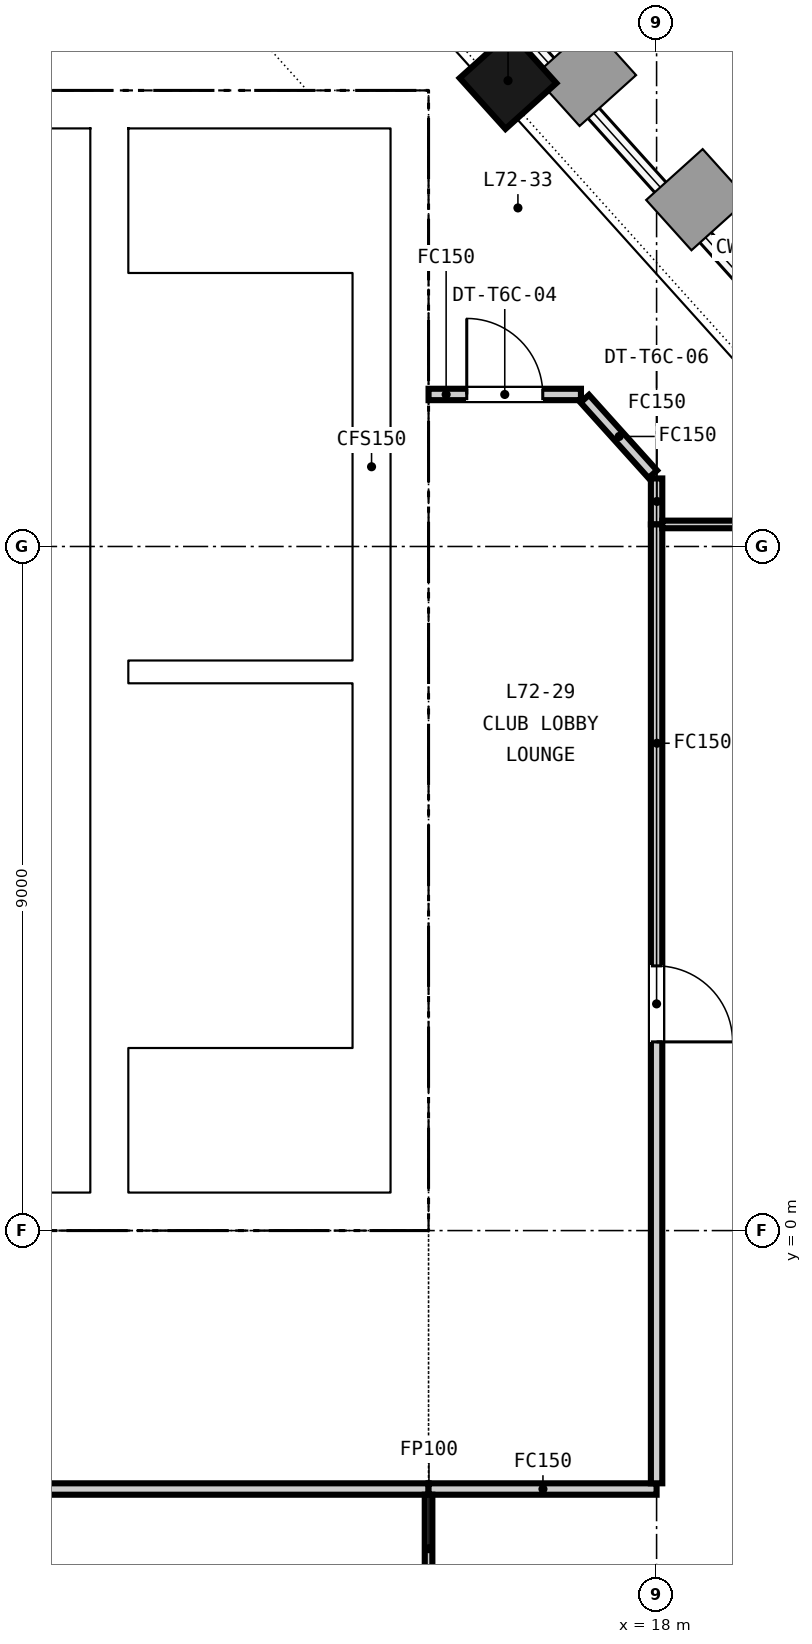
"""IFC4 building model, lengths in metres.
Left out: names, types, materials, properties, quantities, classifications, styles, units other than length and angle.
Written with IfcOpenShell. Run it as: python <this file> out.ifc"""

import sys

from ifc_helpers import new_model, si_unit, direction, frame, frame_2d, origin, origin_2d, place, context, subcontext, project, spatial, rectangle, extrude, element, fill, save


model = new_model("IFC4")
c1 = context("Model", 3, precision=1e-05, world=origin(), true_north=direction((0.0, 1.0)))
c2 = subcontext(c1, "Body", "Model", "MODEL_VIEW")
j1 = project(units=[si_unit("LENGTHUNIT", "METRE"), si_unit("PLANEANGLEUNIT", "RADIAN")], contexts=[c1])
p1 = place(None, origin())
s1 = spatial("IfcSite", under=j1, at=p1, CompositionType="ELEMENT")
p2 = place(p1, origin())
s2 = spatial("IfcBuilding", under=s1, at=p2, CompositionType="ELEMENT")
p3 = place(p2, frame((0.0, 0.0, 282.85)))
s3 = spatial("IfcBuildingStorey", under=s2, at=p3, CompositionType="ELEMENT", Elevation=282.85)
p4 = place(p3, frame((-15.0, 0.25, -0.15), z_axis=(0.0, 0.0, 1.0), x_axis=(1.0, 0.0, 0.0)))
e1 = element("IfcWall", 1, at=p4, inside=s3, PredefinedType="SOLIDWALL", context=c2, shape_type="SweptSolid", body=[
    extrude(rectangle(XDim=30.0, YDim=0.5, at=frame_2d((15.0, 0.0))), origin(), (0.0, 0.0, 1.0), 3.65),
])
p5 = place(p4, frame((5.8, 0.0, 0.15)))
e2 = element("IfcOpeningElement", 2, at=p5, cuts=e1, PredefinedType="OPENING", context=c2, shape_type="SweptSolid", body=[
    extrude(rectangle(XDim=2.4, YDim=2.4, at=frame_2d((1.2, 1.2))), frame((0.0, 0.26, 0.0), z_axis=(0.0, -1.0, 0.0), x_axis=(1.0, 0.0, 0.0)), (0.0, 0.0, 1.0), 0.52),
])
p6 = place(p4, frame((13.8, 0.0, 0.15)))
e3 = element("IfcOpeningElement", 3, at=p6, cuts=e1, PredefinedType="OPENING", context=c2, shape_type="SweptSolid", body=[
    extrude(rectangle(XDim=2.4, YDim=2.4, at=frame_2d((1.2, 1.2))), frame((0.0, 0.26, 0.0), z_axis=(0.0, -1.0, 0.0), x_axis=(1.0, 0.0, 0.0)), (0.0, 0.0, 1.0), 0.52),
])
p7 = place(p4, frame((21.8, 0.0, 0.15)))
e4 = element("IfcOpeningElement", 4, at=p7, cuts=e1, PredefinedType="OPENING", context=c2, shape_type="SweptSolid", body=[
    extrude(rectangle(XDim=2.4, YDim=2.4, at=frame_2d((1.2, 1.2))), frame((0.0, 0.26, 0.0), z_axis=(0.0, -1.0, 0.0), x_axis=(1.0, 0.0, 0.0)), (0.0, 0.0, 1.0), 0.52),
])
p8 = place(p4, frame((1.5, 0.0, 0.15)))
e5 = element("IfcOpeningElement", 5, at=p8, cuts=e1, PredefinedType="OPENING", context=c2, shape_type="SweptSolid", body=[
    extrude(rectangle(XDim=1.2, YDim=2.1, at=frame_2d((0.6, 1.05))), frame((0.0, 0.26, 0.0), z_axis=(0.0, -1.0, 0.0), x_axis=(1.0, 0.0, 0.0)), (0.0, 0.0, 1.0), 0.52),
])
p9 = place(p4, frame((27.3, 0.0, 0.15)))
e6 = element("IfcOpeningElement", 6, at=p9, cuts=e1, PredefinedType="OPENING", context=c2, shape_type="SweptSolid", body=[
    extrude(rectangle(XDim=1.2, YDim=2.1, at=frame_2d((0.6, 1.05))), frame((0.0, 0.26, 0.0), z_axis=(0.0, -1.0, 0.0), x_axis=(1.0, 0.0, 0.0)), (0.0, 0.0, 1.0), 0.52),
])
p10 = place(p3, frame((-15.0, 14.75, -0.15), z_axis=(0.0, 0.0, 1.0), x_axis=(1.0, 0.0, 0.0)))
e7 = element("IfcWall", 7, at=p10, inside=s3, PredefinedType="SOLIDWALL", context=c2, shape_type="SweptSolid", body=[
    extrude(rectangle(XDim=30.0, YDim=0.5, at=frame_2d((15.0, 0.0))), origin(), (0.0, 0.0, 1.0), 3.65),
])
p11 = place(p10, frame((9.25, 0.0, 0.15)))
e8 = element("IfcOpeningElement", 8, at=p11, cuts=e7, PredefinedType="OPENING", context=c2, shape_type="SweptSolid", body=[
    extrude(rectangle(XDim=1.5, YDim=2.1, at=frame_2d((0.75, 1.05))), frame((0.0, 0.26, 0.0), z_axis=(0.0, -1.0, 0.0), x_axis=(1.0, 0.0, 0.0)), (0.0, 0.0, 1.0), 0.52),
])
p12 = place(p10, frame((19.4, 0.0, 0.15)))
e9 = element("IfcOpeningElement", 9, at=p12, cuts=e7, PredefinedType="OPENING", context=c2, shape_type="SweptSolid", body=[
    extrude(rectangle(XDim=1.5, YDim=2.1, at=frame_2d((0.75, 1.05))), frame((0.0, 0.26, 0.0), z_axis=(0.0, -1.0, 0.0), x_axis=(1.0, 0.0, 0.0)), (0.0, 0.0, 1.0), 0.52),
])
p13 = place(p10, frame((1.5, 0.0, 0.15)))
e10 = element("IfcOpeningElement", 10, at=p13, cuts=e7, PredefinedType="OPENING", context=c2, shape_type="SweptSolid", body=[
    extrude(rectangle(XDim=1.2, YDim=2.1, at=frame_2d((0.6, 1.05))), frame((0.0, 0.26, 0.0), z_axis=(0.0, -1.0, 0.0), x_axis=(1.0, 0.0, 0.0)), (0.0, 0.0, 1.0), 0.52),
])
p14 = place(p10, frame((27.3, 0.0, 0.15)))
e11 = element("IfcOpeningElement", 11, at=p14, cuts=e7, PredefinedType="OPENING", context=c2, shape_type="SweptSolid", body=[
    extrude(rectangle(XDim=1.2, YDim=2.1, at=frame_2d((0.6, 1.05))), frame((0.0, 0.26, 0.0), z_axis=(0.0, -1.0, 0.0), x_axis=(1.0, 0.0, 0.0)), (0.0, 0.0, 1.0), 0.52),
])
for number, where, z_axis, x_axis in (
    (12, (14.75, 0.5, -0.15), (0.0, 0.0, 1.0), (0.0, 1.0, 0.0)),
    (13, (10.8, 0.5, -0.15), (0.0, 0.0, 1.0), (0.0, 1.0, 0.0)),
):
    element("IfcWall", number, at=place(p3, frame(where, z_axis=z_axis, x_axis=x_axis)), inside=s3, PredefinedType="SOLIDWALL", context=c2, shape_type="SweptSolid", body=[
        extrude(rectangle(XDim=14.0, YDim=0.5, at=frame_2d((7.0, 0.0))), origin(), (0.0, 0.0, 1.0), 3.65),
    ])
p15 = place(p3, frame((16.045, 15.129, -0.15), z_axis=(0.0, 0.0, 1.0), x_axis=(-0.669130606359, 0.743144825477, 0.0)))
e14 = element("IfcColumn", 14, at=p15, inside=s3, PredefinedType="COLUMN", context=c2, shape_type="SweptSolid", body=[
    extrude(rectangle(XDim=0.9, YDim=0.9, at=origin_2d()), origin(), (0.0, 0.0, 1.0), 3.65),
])
p16 = place(p3, frame((-10.55, 3.5, 0.0), z_axis=(0.0, 0.0, 1.0), x_axis=(1.0, 0.0, 0.0)))
e15 = element("IfcWall", 15, at=p16, inside=s3, PredefinedType="PARTITIONING", context=c2, shape_type="SweptSolid", body=[
    extrude(rectangle(XDim=21.1, YDim=0.2, at=frame_2d((10.55, 0.0))), origin(), (0.0, 0.0, 1.0), 3.5),
])
p17 = place(p16, frame((0.675, 0.0, 0.0)))
e16 = element("IfcOpeningElement", 16, at=p17, cuts=e15, PredefinedType="OPENING", context=c2, shape_type="SweptSolid", body=[
    extrude(rectangle(XDim=1.2, YDim=2.1, at=frame_2d((0.6, 1.05))), frame((0.0, 0.11, 0.0), z_axis=(0.0, -1.0, 0.0), x_axis=(1.0, 0.0, 0.0)), (0.0, 0.0, 1.0), 0.22),
])
p18 = place(p16, frame((3.475, 0.0, 0.0)))
e17 = element("IfcOpeningElement", 17, at=p18, cuts=e15, PredefinedType="OPENING", context=c2, shape_type="SweptSolid", body=[
    extrude(rectangle(XDim=1.2, YDim=2.1, at=frame_2d((0.6, 1.05))), frame((0.0, 0.11, 0.0), z_axis=(0.0, -1.0, 0.0), x_axis=(1.0, 0.0, 0.0)), (0.0, 0.0, 1.0), 0.22),
])
p19 = place(p16, frame((6.275, 0.0, 0.0)))
e18 = element("IfcOpeningElement", 18, at=p19, cuts=e15, PredefinedType="OPENING", context=c2, shape_type="SweptSolid", body=[
    extrude(rectangle(XDim=1.2, YDim=2.1, at=frame_2d((0.6, 1.05))), frame((0.0, 0.11, 0.0), z_axis=(0.0, -1.0, 0.0), x_axis=(1.0, 0.0, 0.0)), (0.0, 0.0, 1.0), 0.22),
])
p20 = place(p16, frame((9.075, 0.0, 0.0)))
e19 = element("IfcOpeningElement", 19, at=p20, cuts=e15, PredefinedType="OPENING", context=c2, shape_type="SweptSolid", body=[
    extrude(rectangle(XDim=1.2, YDim=2.1, at=frame_2d((0.6, 1.05))), frame((0.0, 0.11, 0.0), z_axis=(0.0, -1.0, 0.0), x_axis=(1.0, 0.0, 0.0)), (0.0, 0.0, 1.0), 0.22),
])
p21 = place(p16, frame((11.875, 0.0, 0.0)))
e20 = element("IfcOpeningElement", 20, at=p21, cuts=e15, PredefinedType="OPENING", context=c2, shape_type="SweptSolid", body=[
    extrude(rectangle(XDim=1.2, YDim=2.1, at=frame_2d((0.6, 1.05))), frame((0.0, 0.11, 0.0), z_axis=(0.0, -1.0, 0.0), x_axis=(1.0, 0.0, 0.0)), (0.0, 0.0, 1.0), 0.22),
])
p22 = place(p16, frame((14.675, 0.0, 0.0)))
e21 = element("IfcOpeningElement", 21, at=p22, cuts=e15, PredefinedType="OPENING", context=c2, shape_type="SweptSolid", body=[
    extrude(rectangle(XDim=1.2, YDim=2.1, at=frame_2d((0.6, 1.05))), frame((0.0, 0.11, 0.0), z_axis=(0.0, -1.0, 0.0), x_axis=(1.0, 0.0, 0.0)), (0.0, 0.0, 1.0), 0.22),
])
p23 = place(p16, frame((17.475, 0.0, 0.0)))
e22 = element("IfcOpeningElement", 22, at=p23, cuts=e15, PredefinedType="OPENING", context=c2, shape_type="SweptSolid", body=[
    extrude(rectangle(XDim=1.2, YDim=2.1, at=frame_2d((0.6, 1.05))), frame((0.0, 0.11, 0.0), z_axis=(0.0, -1.0, 0.0), x_axis=(1.0, 0.0, 0.0)), (0.0, 0.0, 1.0), 0.22),
])
p24 = place(p16, frame((19.9, 0.0, 0.0)))
e23 = element("IfcOpeningElement", 23, at=p24, cuts=e15, PredefinedType="OPENING", context=c2, shape_type="SweptSolid", body=[
    extrude(rectangle(XDim=0.9, YDim=2.1, at=frame_2d((0.45, 1.05))), frame((0.0, 0.11, 0.0), z_axis=(0.0, -1.0, 0.0), x_axis=(1.0, 0.0, 0.0)), (0.0, 0.0, 1.0), 0.22),
])
p25 = place(p3, frame((-10.55, 6.025, 0.0), z_axis=(0.0, 0.0, 1.0), x_axis=(1.0, 0.0, 0.0)))
e24 = element("IfcWall", 24, at=p25, inside=s3, PredefinedType="PARTITIONING", context=c2, shape_type="SweptSolid", body=[
    extrude(rectangle(XDim=21.1, YDim=0.25, at=frame_2d((10.55, 0.0))), origin(), (0.0, 0.0, 1.0), 3.5),
])
p26 = place(p3, frame((-4.125, 8.55, 0.0), z_axis=(0.0, 0.0, 1.0), x_axis=(1.0, 0.0, 0.0)))
e25 = element("IfcWall", 25, at=p26, inside=s3, PredefinedType="PARTITIONING", context=c2, shape_type="SweptSolid", body=[
    extrude(rectangle(XDim=14.675, YDim=0.2, at=frame_2d((7.337, 0.0))), origin(), (0.0, 0.0, 1.0), 3.5),
])
p27 = place(p26, frame((1.413, 0.0, 0.0)))
e26 = element("IfcOpeningElement", 26, at=p27, cuts=e25, PredefinedType="OPENING", context=c2, shape_type="SweptSolid", body=[
    extrude(rectangle(XDim=1.0, YDim=2.1, at=frame_2d((0.5, 1.05))), frame((0.0, 0.11, 0.0), z_axis=(0.0, -1.0, 0.0), x_axis=(1.0, 0.0, 0.0)), (0.0, 0.0, 1.0), 0.22),
])
p28 = place(p26, frame((5.0, 0.0, 0.0)))
e27 = element("IfcOpeningElement", 27, at=p28, cuts=e25, PredefinedType="OPENING", context=c2, shape_type="SweptSolid", body=[
    extrude(rectangle(XDim=1.0, YDim=2.1, at=frame_2d((0.5, 1.05))), frame((0.0, 0.11, 0.0), z_axis=(0.0, -1.0, 0.0), x_axis=(1.0, 0.0, 0.0)), (0.0, 0.0, 1.0), 0.22),
])
p29 = place(p26, frame((9.613, 0.0, 0.0)))
e28 = element("IfcOpeningElement", 28, at=p29, cuts=e25, PredefinedType="OPENING", context=c2, shape_type="SweptSolid", body=[
    extrude(rectangle(XDim=1.0, YDim=2.1, at=frame_2d((0.5, 1.05))), frame((0.0, 0.11, 0.0), z_axis=(0.0, -1.0, 0.0), x_axis=(1.0, 0.0, 0.0)), (0.0, 0.0, 1.0), 0.22),
])
p30 = place(p26, frame((13.475, 0.0, 0.0)))
e29 = element("IfcOpeningElement", 29, at=p30, cuts=e25, PredefinedType="OPENING", context=c2, shape_type="SweptSolid", body=[
    extrude(rectangle(XDim=0.9, YDim=2.1, at=frame_2d((0.45, 1.05))), frame((0.0, 0.11, 0.0), z_axis=(0.0, -1.0, 0.0), x_axis=(1.0, 0.0, 0.0)), (0.0, 0.0, 1.0), 0.22),
])
p31 = place(p3, frame((5.9, 11.2, 0.0), z_axis=(0.0, 0.0, 1.0), x_axis=(1.0, 0.0, 0.0)))
e30 = element("IfcWall", 30, at=p31, inside=s3, PredefinedType="PARTITIONING", context=c2, shape_type="SweptSolid", body=[
    extrude(rectangle(XDim=4.65, YDim=0.2, at=frame_2d((2.325, 0.0))), origin(), (0.0, 0.0, 1.0), 3.5),
])
p32 = place(p31, frame((1.025, 0.0, 0.0)))
e31 = element("IfcOpeningElement", 31, at=p32, cuts=e30, PredefinedType="OPENING", context=c2, shape_type="SweptSolid", body=[
    extrude(rectangle(XDim=1.0, YDim=2.1, at=frame_2d((0.5, 1.05))), frame((0.0, 0.11, 0.0), z_axis=(0.0, -1.0, 0.0), x_axis=(1.0, 0.0, 0.0)), (0.0, 0.0, 1.0), 0.22),
])
p33 = place(p31, frame((3.4, 0.0, 0.0)))
e32 = element("IfcOpeningElement", 32, at=p33, cuts=e30, PredefinedType="OPENING", context=c2, shape_type="SweptSolid", body=[
    extrude(rectangle(XDim=0.9, YDim=2.1, at=frame_2d((0.45, 1.05))), frame((0.0, 0.11, 0.0), z_axis=(0.0, -1.0, 0.0), x_axis=(1.0, 0.0, 0.0)), (0.0, 0.0, 1.0), 0.22),
])
p34 = place(p3, frame((11.05, 7.35, 0.0), z_axis=(0.0, 0.0, 1.0), x_axis=(1.0, 0.0, 0.0)))
e33 = element("IfcWall", 33, at=p34, inside=s3, PredefinedType="SOLIDWALL", context=c2, shape_type="SweptSolid", body=[
    extrude(rectangle(XDim=2.95, YDim=0.3, at=frame_2d((1.475, 0.0))), origin(), (0.0, 0.0, 1.0), 3.5),
])
p35 = place(p3, frame((14.25, 0.5, 0.0), z_axis=(0.0, 0.0, 1.0), x_axis=(0.0, 1.0, 0.0)))
e34 = element("IfcWall", 34, at=p35, inside=s3, PredefinedType="SOLIDWALL", context=c2, shape_type="SweptSolid", body=[
    extrude(rectangle(XDim=14.0, YDim=0.5, at=frame_2d((7.0, 0.0))), origin(), (0.0, 0.0, 1.0), 3.5),
])
p36 = place(p3, frame((15.0, -3.4, 0.0), z_axis=(0.0, 0.0, 1.0), x_axis=(-1.0, 0.0, 0.0)))
e35 = element("IfcWall", 35, at=p36, inside=s3, PredefinedType="PARTITIONING", context=c2, shape_type="SweptSolid", body=[
    extrude(rectangle(XDim=13.156, YDim=0.15, at=frame_2d((6.578, 0.0))), origin(), (0.0, 0.0, 1.0), 2.75),
])
p37 = place(p36, frame((5.678, 0.0, 0.0)))
e36 = element("IfcOpeningElement", 36, at=p37, cuts=e35, PredefinedType="OPENING", context=c2, shape_type="SweptSolid", body=[
    extrude(rectangle(XDim=1.8, YDim=2.1, at=frame_2d((0.9, 1.05))), frame((0.0, 0.085, 0.0), z_axis=(0.0, -1.0, 0.0), x_axis=(1.0, 0.0, 0.0)), (0.0, 0.0, 1.0), 0.17),
])
p38 = place(p3, frame((18.0, 9.895, 0.0), z_axis=(0.0, 0.0, 1.0), x_axis=(0.0, -1.0, 0.0)))
e37 = element("IfcWall", 37, at=p38, inside=s3, PredefinedType="PARTITIONING", context=c2, shape_type="SweptSolid", body=[
    extrude(rectangle(XDim=0.605, YDim=0.15, at=frame_2d((0.302, 0.0))), origin(), (0.0, 0.0, 1.0), 2.75),
])
p39 = place(p3, frame((18.0, -3.4, 0.0), z_axis=(0.0, 0.0, 1.0), x_axis=(-1.0, 0.0, 0.0)))
e38 = element("IfcWall", 38, at=p39, inside=s3, PredefinedType="PARTITIONING", context=c2, shape_type="SweptSolid", body=[
    extrude(rectangle(XDim=3.0, YDim=0.15, at=frame_2d((1.5, 0.0))), origin(), (0.0, 0.0, 1.0), 2.75),
])
p40 = place(p3, frame((18.0, 9.29, 0.0), z_axis=(0.0, 0.0, 1.0), x_axis=(0.0, -1.0, 0.0)))
e39 = element("IfcWall", 39, at=p40, inside=s3, PredefinedType="PARTITIONING", context=c2, shape_type="SweptSolid", body=[
    extrude(rectangle(XDim=12.615, YDim=0.15, at=frame_2d((6.308, 0.0))), origin(), (0.0, 0.0, 1.0), 2.75),
])
p41 = place(p40, frame((5.808, 0.0, 0.0)))
e40 = element("IfcOpeningElement", 40, at=p41, cuts=e39, PredefinedType="OPENING", context=c2, shape_type="SweptSolid", body=[
    extrude(rectangle(XDim=1.0, YDim=2.1, at=frame_2d((0.5, 1.05))), frame((0.0, 0.085, 0.0), z_axis=(0.0, -1.0, 0.0), x_axis=(1.0, 0.0, 0.0)), (0.0, 0.0, 1.0), 0.17),
])
p42 = place(p3, frame((15.0, 11.0, 0.0), z_axis=(0.0, 0.0, 1.0), x_axis=(1.0, 0.0, 0.0)))
e41 = element("IfcWall", 41, at=p42, inside=s3, PredefinedType="PARTITIONING", context=c2, shape_type="SweptSolid", body=[
    extrude(rectangle(XDim=2.005, YDim=0.15, at=frame_2d((1.002, 0.0))), origin(), (0.0, 0.0, 1.0), 2.75),
])
p43 = place(p42, frame((0.502, 0.0, 0.0)))
e42 = element("IfcOpeningElement", 42, at=p43, cuts=e41, PredefinedType="OPENING", context=c2, shape_type="SweptSolid", body=[
    extrude(rectangle(XDim=1.0, YDim=2.1, at=frame_2d((0.5, 1.05))), frame((0.0, 0.085, 0.0), z_axis=(0.0, -1.0, 0.0), x_axis=(1.0, 0.0, 0.0)), (0.0, 0.0, 1.0), 0.17),
])
p44 = place(p3, frame((17.055, 10.944, 0.0), z_axis=(0.0, 0.0, 1.0), x_axis=(0.669065612335, -0.743203341213, 0.0)))
e43 = element("IfcWall", 43, at=p44, inside=s3, PredefinedType="PARTITIONING", context=c2, shape_type="SweptSolid", body=[
    extrude(rectangle(XDim=1.337, YDim=0.15, at=frame_2d((0.668, 0.0))), origin(), (0.0, 0.0, 1.0), 2.75),
])
p45 = place(p3, frame((18.075, 9.29, 0.0), z_axis=(0.0, 0.0, 1.0), x_axis=(1.0, 0.0, 0.0)))
e44 = element("IfcWall", 44, at=p45, inside=s3, PredefinedType="PARTITIONING", context=c2, shape_type="SweptSolid", body=[
    extrude(rectangle(XDim=3.026, YDim=0.1, at=frame_2d((1.513, 0.0))), origin(), (0.0, 0.0, 1.0), 2.75),
])
p46 = place(p3, frame((15.0, -4.895, 0.0), z_axis=(0.0, 0.0, 1.0), x_axis=(0.0, 1.0, 0.0)))
e45 = element("IfcWall", 45, at=p46, inside=s3, PredefinedType="PARTITIONING", context=c2, shape_type="SweptSolid", body=[
    extrude(rectangle(XDim=1.42, YDim=0.1, at=frame_2d((0.71, 0.0))), origin(), (0.0, 0.0, 1.0), 2.75),
])
p47 = place(p24, origin())
e46 = element("IfcDoor", 46, at=p47, inside=s3, OperationType="SINGLE_SWING_RIGHT", PredefinedType="DOOR", context=c2, shape_type="SweptSolid", body=[
    extrude(rectangle(XDim=0.9, YDim=2.1, at=frame_2d((0.45, 1.05))), frame((0.0, 0.025, 0.0), z_axis=(0.0, -1.0, 0.0), x_axis=(1.0, 0.0, 0.0)), (0.0, 0.0, 1.0), 0.05),
])
fill(e23, e46)
p48 = place(p30, origin())
e47 = element("IfcDoor", 47, at=p48, inside=s3, OperationType="SINGLE_SWING_RIGHT", PredefinedType="DOOR", context=c2, shape_type="SweptSolid", body=[
    extrude(rectangle(XDim=0.9, YDim=2.1, at=frame_2d((0.45, 1.05))), frame((0.0, 0.025, 0.0), z_axis=(0.0, -1.0, 0.0), x_axis=(1.0, 0.0, 0.0)), (0.0, 0.0, 1.0), 0.05),
])
fill(e29, e47)
p49 = place(p33, origin())
e48 = element("IfcDoor", 48, at=p49, inside=s3, OperationType="SINGLE_SWING_LEFT", PredefinedType="DOOR", context=c2, shape_type="SweptSolid", body=[
    extrude(rectangle(XDim=0.9, YDim=2.1, at=frame_2d((0.45, 1.05))), frame((0.0, 0.025, 0.0), z_axis=(0.0, -1.0, 0.0), x_axis=(1.0, 0.0, 0.0)), (0.0, 0.0, 1.0), 0.05),
])
fill(e32, e48)
p50 = place(p14, origin())
e49 = element("IfcDoor", 49, at=p50, inside=s3, OperationType="SINGLE_SWING_LEFT", PredefinedType="DOOR", context=c2, shape_type="SweptSolid", body=[
    extrude(rectangle(XDim=1.2, YDim=2.1, at=frame_2d((0.6, 1.05))), frame((0.0, 0.025, 0.0), z_axis=(0.0, -1.0, 0.0), x_axis=(1.0, 0.0, 0.0)), (0.0, 0.0, 1.0), 0.05),
])
fill(e11, e49)
p51 = place(p9, origin())
e50 = element("IfcDoor", 50, at=p51, inside=s3, OperationType="SINGLE_SWING_RIGHT", PredefinedType="DOOR", context=c2, shape_type="SweptSolid", body=[
    extrude(rectangle(XDim=1.2, YDim=2.1, at=frame_2d((0.6, 1.05))), frame((0.0, 0.025, 0.0), z_axis=(0.0, -1.0, 0.0), x_axis=(1.0, 0.0, 0.0)), (0.0, 0.0, 1.0), 0.05),
])
fill(e6, e50)
p52 = place(p43, origin())
e51 = element("IfcDoor", 51, at=p52, inside=s3, OperationType="SINGLE_SWING_LEFT", PredefinedType="DOOR", context=c2, shape_type="SweptSolid", body=[
    extrude(rectangle(XDim=1.0, YDim=2.1, at=frame_2d((0.5, 1.05))), frame((0.0, 0.025, 0.0), z_axis=(0.0, -1.0, 0.0), x_axis=(1.0, 0.0, 0.0)), (0.0, 0.0, 1.0), 0.05),
])
fill(e42, e51)
p53 = place(p41, origin())
e52 = element("IfcDoor", 52, at=p53, inside=s3, OperationType="SINGLE_SWING_RIGHT", PredefinedType="DOOR", context=c2, shape_type="SweptSolid", body=[
    extrude(rectangle(XDim=1.0, YDim=2.1, at=frame_2d((0.5, 1.05))), frame((0.0, 0.025, 0.0), z_axis=(0.0, -1.0, 0.0), x_axis=(1.0, 0.0, 0.0)), (0.0, 0.0, 1.0), 0.05),
])
fill(e40, e52)
save(model, sys.argv[1])
